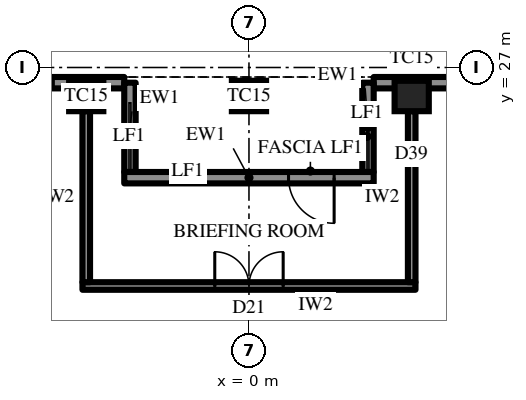
"""IFC4 building model, lengths in metres.
Left out: names, types, materials, properties, quantities, classifications, styles, units other than length and angle.
Written with IfcOpenShell. Run it as: python <this file> out.ifc"""

import sys

from ifc_helpers import new_model, si_unit, direction, frame, frame_2d, origin, origin_2d, place, context, subcontext, project, spatial, rectangle, extrude, element, fill, save


model = new_model("IFC4")
c1 = context("Model", 3, precision=1e-05, world=origin(), true_north=direction((0.0, 1.0)))
c2 = subcontext(c1, "Body", "Model", "MODEL_VIEW")
j1 = project(units=[si_unit("LENGTHUNIT", "METRE"), si_unit("PLANEANGLEUNIT", "RADIAN")], contexts=[c1])
p1 = place(None, origin())
s1 = spatial("IfcSite", under=j1, at=p1, CompositionType="ELEMENT")
p2 = place(p1, origin())
s2 = spatial("IfcBuilding", under=s1, at=p2, CompositionType="ELEMENT")
p3 = place(p2, frame((0.0, 0.0, 361.9)))
s3 = spatial("IfcBuildingStorey", under=s2, at=p3, CompositionType="ELEMENT", Elevation=361.9)
for number, where, z_axis, x_axis in (
    (1, (4.282, 26.25, 0.0), (0.0, 0.0, 1.0), (-1.0, 0.0, 0.0)),
    (2, (0.0, 26.25, 0.0), (0.0, 0.0, 1.0), (-1.0, 0.0, 0.0)),
    (3, (-4.282, 26.25, 0.0), (0.0, 0.0, 1.0), (-1.0, 0.0, 0.0)),
):
    element("IfcColumn", number, at=place(p3, frame(where, z_axis=z_axis, x_axis=x_axis)), inside=s3, PredefinedType="COLUMN", context=c2, shape_type="SweptSolid", body=[
        extrude(rectangle(XDim=0.9, YDim=0.8, at=origin_2d()), origin(), (0.0, 0.0, 1.0), 4.2),
    ])
p4 = place(p3, frame((12.846, 26.6, 0.0), z_axis=(0.0, 0.0, 1.0), x_axis=(-1.0, 0.0, 0.0)))
e4 = element("IfcWall", 4, at=p4, inside=s3, PredefinedType="SOLIDWALL", context=c2, shape_type="SweptSolid", body=[
    extrude(rectangle(XDim=9.564, YDim=0.3, at=frame_2d((4.782, 0.0))), origin(), (0.0, 0.0, 1.0), 2.9),
])
p5 = place(p4, frame((0.866, 0.0, 0.6)))
e5 = element("IfcOpeningElement", 5, at=p5, cuts=e4, PredefinedType="OPENING", context=c2, shape_type="SweptSolid", body=[
    extrude(rectangle(XDim=2.55, YDim=2.05, at=frame_2d((1.275, 1.025))), frame((0.0, 0.16, 0.0), z_axis=(0.0, -1.0, 0.0), x_axis=(1.0, 0.0, 0.0)), (0.0, 0.0, 1.0), 0.32),
])
p6 = place(p4, frame((5.823, 0.0, 0.0)))
e6 = element("IfcOpeningElement", 6, at=p6, cuts=e4, PredefinedType="OPENING", context=c2, shape_type="SweptSolid", body=[
    extrude(rectangle(XDim=1.2, YDim=2.4, at=frame_2d((0.6, 1.2))), frame((0.0, 0.16, 0.0), z_axis=(0.0, -1.0, 0.0), x_axis=(1.0, 0.0, 0.0)), (0.0, 0.0, 1.0), 0.32),
])
p7 = place(p3, frame((-3.282, 26.6, 0.0), z_axis=(0.0, 0.0, 1.0), x_axis=(-1.0, 0.0, 0.0)))
e7 = element("IfcWall", 7, at=p7, inside=s3, PredefinedType="SOLIDWALL", context=c2, shape_type="SweptSolid", body=[
    extrude(rectangle(XDim=9.564, YDim=0.3, at=frame_2d((4.782, 0.0))), origin(), (0.0, 0.0, 1.0), 2.9),
])
p8 = place(p7, frame((1.866, 0.0, 0.6)))
e8 = element("IfcOpeningElement", 8, at=p8, cuts=e7, PredefinedType="OPENING", context=c2, shape_type="SweptSolid", body=[
    extrude(rectangle(XDim=2.55, YDim=2.05, at=frame_2d((1.275, 1.025))), frame((0.0, 0.16, 0.0), z_axis=(0.0, -1.0, 0.0), x_axis=(1.0, 0.0, 0.0)), (0.0, 0.0, 1.0), 0.32),
])
p9 = place(p7, frame((6.148, 0.0, 0.6)))
e9 = element("IfcOpeningElement", 9, at=p9, cuts=e7, PredefinedType="OPENING", context=c2, shape_type="SweptSolid", body=[
    extrude(rectangle(XDim=2.55, YDim=2.05, at=frame_2d((1.275, 1.025))), frame((0.0, 0.16, 0.0), z_axis=(0.0, -1.0, 0.0), x_axis=(1.0, 0.0, 0.0)), (0.0, 0.0, 1.0), 0.32),
])
for number, where, z_axis, x_axis in (
    (10, (3.132, 26.6, 0.0), (0.0, 0.0, 1.0), (0.0, -1.0, 0.0)),
    (11, (-3.132, 26.6, 0.0), (0.0, 0.0, 1.0), (0.0, -1.0, 0.0)),
):
    element("IfcWall", number, at=place(p3, frame(where, z_axis=z_axis, x_axis=x_axis)), inside=s3, PredefinedType="SOLIDWALL", context=c2, shape_type="SweptSolid", body=[
        extrude(rectangle(XDim=2.35, YDim=0.3, at=frame_2d((1.175, 0.0))), origin(), (0.0, 0.0, 1.0), 2.9),
    ])
p10 = place(p3, frame((3.282, 24.1, 0.0), z_axis=(0.0, 0.0, 1.0), x_axis=(-1.0, 0.0, 0.0)))
e12 = element("IfcWall", 12, at=p10, inside=s3, PredefinedType="SOLIDWALL", context=c2, shape_type="SweptSolid", body=[
    extrude(rectangle(XDim=6.564, YDim=0.3, at=frame_2d((3.282, 0.0))), origin(), (0.0, 0.0, 1.0), 2.9),
])
p11 = place(p10, frame((1.041, 0.0, 0.0)))
e13 = element("IfcOpeningElement", 13, at=p11, cuts=e12, PredefinedType="OPENING", context=c2, shape_type="SweptSolid", body=[
    extrude(rectangle(XDim=1.2, YDim=2.4, at=frame_2d((0.6, 1.2))), frame((0.0, 0.16, 0.0), z_axis=(0.0, -1.0, 0.0), x_axis=(1.0, 0.0, 0.0)), (0.0, 0.0, 1.0), 0.32),
])
p12 = place(p3, frame((4.382, 21.25, 0.0), z_axis=(0.0, 0.0, 1.0), x_axis=(-1.0, 0.0, 0.0)))
e14 = element("IfcWall", 14, at=p12, inside=s3, PredefinedType="PARTITIONING", context=c2, shape_type="SweptSolid", body=[
    extrude(rectangle(XDim=8.764, YDim=0.2, at=frame_2d((4.382, 0.0))), origin(), (0.0, 0.0, 1.0), 4.0),
])
p13 = place(p12, frame((3.482, 0.0, 0.0)))
e15 = element("IfcOpeningElement", 15, at=p13, cuts=e14, PredefinedType="OPENING", context=c2, shape_type="SweptSolid", body=[
    extrude(rectangle(XDim=1.8, YDim=2.4, at=frame_2d((0.9, 1.2))), frame((0.0, 0.11, 0.0), z_axis=(0.0, -1.0, 0.0), x_axis=(1.0, 0.0, 0.0)), (0.0, 0.0, 1.0), 0.22),
])
for number, where, z_axis, x_axis in (
    (16, (4.282, 21.35, 0.0), (0.0, 0.0, 1.0), (0.0, 1.0, 0.0)),
    (17, (-4.282, 21.35, 0.0), (0.0, 0.0, 1.0), (0.0, 1.0, 0.0)),
):
    element("IfcWall", number, at=place(p3, frame(where, z_axis=z_axis, x_axis=x_axis)), inside=s3, PredefinedType="PARTITIONING", context=c2, shape_type="SweptSolid", body=[
        extrude(rectangle(XDim=4.5, YDim=0.2, at=frame_2d((2.25, 0.0))), origin(), (0.0, 0.0, 1.0), 2.992),
    ])
p14 = place(p8, origin())
e18 = element("IfcWindow", 18, at=p14, inside=s3, PartitioningType="SINGLE_PANEL", PredefinedType="WINDOW", context=c2, shape_type="SweptSolid", body=[
    extrude(rectangle(XDim=2.55, YDim=2.05, at=frame_2d((1.275, 1.025))), frame((0.0, 0.03, 0.0), z_axis=(0.0, -1.0, 0.0), x_axis=(1.0, 0.0, 0.0)), (0.0, 0.0, 1.0), 0.06),
])
fill(e8, e18)
p15 = place(p11, origin())
e19 = element("IfcDoor", 19, at=p15, inside=s3, OperationType="SINGLE_SWING_RIGHT", PredefinedType="DOOR", context=c2, shape_type="SweptSolid", body=[
    extrude(rectangle(XDim=1.2, YDim=2.4, at=frame_2d((0.6, 1.2))), frame((0.0, 0.025, 0.0), z_axis=(0.0, -1.0, 0.0), x_axis=(1.0, 0.0, 0.0)), (0.0, 0.0, 1.0), 0.05),
])
fill(e13, e19)
p16 = place(p13, frame((1.8, 0.0, 0.0), z_axis=(0.0, 0.0, 1.0), x_axis=(-1.0, 0.0, 0.0)))
e20 = element("IfcDoor", 20, at=p16, inside=s3, OperationType="DOUBLE_DOOR_SINGLE_SWING", PredefinedType="DOOR", context=c2, shape_type="SweptSolid", body=[
    extrude(rectangle(XDim=1.8, YDim=2.4, at=frame_2d((0.9, 1.2))), frame((0.0, 0.025, 0.0), z_axis=(0.0, -1.0, 0.0), x_axis=(1.0, 0.0, 0.0)), (0.0, 0.0, 1.0), 0.05),
])
fill(e15, e20)
save(model, sys.argv[1])
